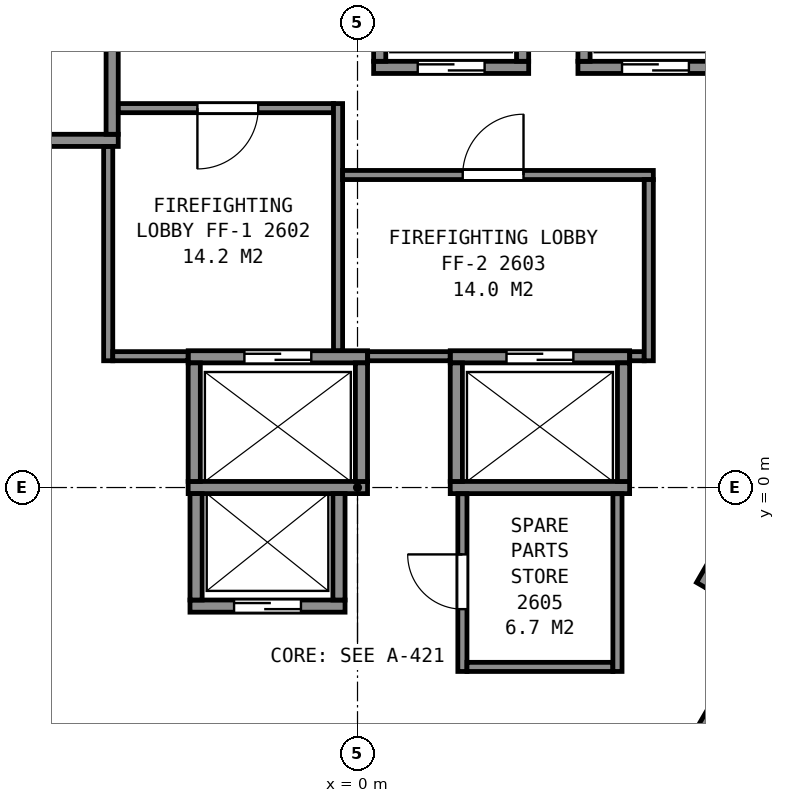
"""IFC4 building model, lengths in metres.
Left out: names, types, materials, properties, quantities, classifications, styles, units other than length and angle.
Written with IfcOpenShell. Run it as: python <this file> out.ifc"""

import sys

from ifc_helpers import new_model, si_unit, direction, frame, frame_2d, origin, place, context, subcontext, project, spatial, rectangle, extrude, element, fill, save


model = new_model("IFC4")
c1 = context("Model", 3, precision=1e-05, world=origin(), true_north=direction((0.0, 1.0)))
c2 = subcontext(c1, "Body", "Model", "MODEL_VIEW")
j1 = project(units=[si_unit("LENGTHUNIT", "METRE"), si_unit("PLANEANGLEUNIT", "RADIAN")], contexts=[c1])
p1 = place(None, origin())
s1 = spatial("IfcSite", under=j1, at=p1, CompositionType="ELEMENT")
p2 = place(p1, origin())
s2 = spatial("IfcBuilding", under=s1, at=p2, CompositionType="ELEMENT")
p3 = place(p2, frame((0.0, 0.0, 110.8)))
s3 = spatial("IfcBuildingStorey", under=s2, at=p3, CompositionType="ELEMENT", Elevation=110.8)
p4 = place(p3, frame((-2.755, -1.95, 0.0), z_axis=(0.0, 0.0, 1.0), x_axis=(1.0, 0.0, 0.0)))
e1 = element("IfcWall", 1, at=p4, inside=s3, PredefinedType="PARTITIONING", context=c2, shape_type="SweptSolid", body=[
    extrude(rectangle(XDim=2.55, YDim=0.2, at=frame_2d((1.275, 0.0))), origin(), (0.0, 0.0, 1.0), 3.6),
])
p5 = place(p4, frame((0.725, 0.0, 0.0)))
e2 = element("IfcOpeningElement", 2, at=p5, cuts=e1, PredefinedType="OPENING", context=c2, shape_type="SweptSolid", body=[
    extrude(rectangle(XDim=1.1, YDim=2.1, at=frame_2d((0.55, 1.05))), frame((0.0, 0.11, 0.0), z_axis=(0.0, -1.0, 0.0), x_axis=(1.0, 0.0, 0.0)), (0.0, 0.0, 1.0), 0.22),
])
p6 = place(p3, frame((-2.785, 0.0, 0.0), z_axis=(0.0, 0.0, 1.0), x_axis=(1.0, 0.0, 0.0)))
e3 = element("IfcWall", 3, at=p6, inside=s3, PredefinedType="PARTITIONING", context=c2, shape_type="SweptSolid", body=[
    extrude(rectangle(XDim=2.95, YDim=0.2, at=frame_2d((1.475, 0.0))), origin(), (0.0, 0.0, 1.0), 3.6),
])
p7 = place(p3, frame((1.525, 0.0, 0.0), z_axis=(0.0, 0.0, 1.0), x_axis=(1.0, 0.0, 0.0)))
e4 = element("IfcWall", 4, at=p7, inside=s3, PredefinedType="PARTITIONING", context=c2, shape_type="SweptSolid", body=[
    extrude(rectangle(XDim=2.95, YDim=0.2, at=frame_2d((1.475, 0.0))), origin(), (0.0, 0.0, 1.0), 3.6),
])
p8 = place(p3, frame((-2.785, 2.15, 0.0), z_axis=(0.0, 0.0, 1.0), x_axis=(1.0, 0.0, 0.0)))
e5 = element("IfcWall", 5, at=p8, inside=s3, PredefinedType="PARTITIONING", context=c2, shape_type="SweptSolid", body=[
    extrude(rectangle(XDim=2.95, YDim=0.2, at=frame_2d((1.475, 0.0))), origin(), (0.0, 0.0, 1.0), 3.6),
])
p9 = place(p8, frame((0.925, 0.0, 0.0)))
e6 = element("IfcOpeningElement", 6, at=p9, cuts=e5, PredefinedType="OPENING", context=c2, shape_type="SweptSolid", body=[
    extrude(rectangle(XDim=1.1, YDim=2.1, at=frame_2d((0.55, 1.05))), frame((0.0, 0.11, 0.0), z_axis=(0.0, -1.0, 0.0), x_axis=(1.0, 0.0, 0.0)), (0.0, 0.0, 1.0), 0.22),
])
p10 = place(p3, frame((1.525, 2.15, 0.0), z_axis=(0.0, 0.0, 1.0), x_axis=(1.0, 0.0, 0.0)))
e7 = element("IfcWall", 7, at=p10, inside=s3, PredefinedType="PARTITIONING", context=c2, shape_type="SweptSolid", body=[
    extrude(rectangle(XDim=2.95, YDim=0.2, at=frame_2d((1.475, 0.0))), origin(), (0.0, 0.0, 1.0), 3.6),
])
p11 = place(p10, frame((0.925, 0.0, 0.0)))
e8 = element("IfcOpeningElement", 8, at=p11, cuts=e7, PredefinedType="OPENING", context=c2, shape_type="SweptSolid", body=[
    extrude(rectangle(XDim=1.1, YDim=2.1, at=frame_2d((0.55, 1.05))), frame((0.0, 0.11, 0.0), z_axis=(0.0, -1.0, 0.0), x_axis=(1.0, 0.0, 0.0)), (0.0, 0.0, 1.0), 0.22),
])
p12 = place(p3, frame((-6.285, 5.71, 0.0), z_axis=(0.0, 0.0, 1.0), x_axis=(1.0, 0.0, 0.0)))
e9 = element("IfcWall", 9, at=p12, inside=s3, PredefinedType="PARTITIONING", context=c2, shape_type="SweptSolid", body=[
    extrude(rectangle(XDim=2.35, YDim=0.2, at=frame_2d((1.175, 0.0))), origin(), (0.0, 0.0, 1.0), 3.6),
])
p13 = place(p3, frame((0.265, 6.91, 0.0), z_axis=(0.0, 0.0, 1.0), x_axis=(1.0, 0.0, 0.0)))
e10 = element("IfcWall", 10, at=p13, inside=s3, PredefinedType="PARTITIONING", context=c2, shape_type="SweptSolid", body=[
    extrude(rectangle(XDim=2.55, YDim=0.2, at=frame_2d((1.275, 0.0))), origin(), (0.0, 0.0, 1.0), 3.6),
])
p14 = place(p13, frame((0.725, 0.0, 0.0)))
e11 = element("IfcOpeningElement", 11, at=p14, cuts=e10, PredefinedType="OPENING", context=c2, shape_type="SweptSolid", body=[
    extrude(rectangle(XDim=1.1, YDim=2.1, at=frame_2d((0.55, 1.05))), frame((0.0, 0.11, 0.0), z_axis=(0.0, -1.0, 0.0), x_axis=(1.0, 0.0, 0.0)), (0.0, 0.0, 1.0), 0.22),
])
p15 = place(p3, frame((3.625, 6.91, 0.0), z_axis=(0.0, 0.0, 1.0), x_axis=(1.0, 0.0, 0.0)))
e12 = element("IfcWall", 12, at=p15, inside=s3, PredefinedType="PARTITIONING", context=c2, shape_type="SweptSolid", body=[
    extrude(rectangle(XDim=2.55, YDim=0.2, at=frame_2d((1.275, 0.0))), origin(), (0.0, 0.0, 1.0), 3.6),
])
p16 = place(p15, frame((0.725, 0.0, 0.0)))
e13 = element("IfcOpeningElement", 13, at=p16, cuts=e12, PredefinedType="OPENING", context=c2, shape_type="SweptSolid", body=[
    extrude(rectangle(XDim=1.1, YDim=2.1, at=frame_2d((0.55, 1.05))), frame((0.0, 0.11, 0.0), z_axis=(0.0, -1.0, 0.0), x_axis=(1.0, 0.0, 0.0)), (0.0, 0.0, 1.0), 0.22),
])
p17 = place(p3, frame((5.527, -4.247, 0.0), z_axis=(0.0, 0.0, 1.0), x_axis=(0.499938297808, 0.866061024631, 0.0)))
e14 = element("IfcWall", 14, at=p17, inside=s3, PredefinedType="PARTITIONING", context=c2, shape_type="SweptSolid", body=[
    extrude(rectangle(XDim=2.35, YDim=0.2, at=frame_2d((1.175, 0.0))), origin(), (0.0, 0.0, 1.0), 3.6),
])
p18 = place(p17, frame((0.725, 0.0, 0.0)))
e15 = element("IfcOpeningElement", 15, at=p18, cuts=e14, PredefinedType="OPENING", context=c2, shape_type="SweptSolid", body=[
    extrude(rectangle(XDim=1.1, YDim=2.1, at=frame_2d((0.55, 1.05))), frame((0.0, 0.11, 0.0), z_axis=(0.0, -1.0, 0.0), x_axis=(1.0, 0.0, 0.0)), (0.0, 0.0, 1.0), 0.22),
])
p19 = place(p3, frame((5.663, -1.612, 0.0), z_axis=(0.0, 0.0, 1.0), x_axis=(0.49998122708, 0.866036242063, 0.0)))
e16 = element("IfcWall", 16, at=p19, inside=s3, PredefinedType="PARTITIONING", context=c2, shape_type="SweptSolid", body=[
    extrude(rectangle(XDim=4.9, YDim=0.2, at=frame_2d((2.45, 0.0))), origin(), (0.0, 0.0, 1.0), 3.6),
])
p20 = place(p3, frame((4.375, 0.1, 0.0), z_axis=(0.0, 0.0, 1.0), x_axis=(0.0, 1.0, 0.0)))
e17 = element("IfcWall", 17, at=p20, inside=s3, PredefinedType="PARTITIONING", context=c2, shape_type="SweptSolid", body=[
    extrude(rectangle(XDim=1.95, YDim=0.2, at=frame_2d((0.975, 0.0))), origin(), (0.0, 0.0, 1.0), 3.6),
])
for number, where, z_axis, x_axis in (
    (18, (3.725, 7.01, 0.0), (0.0, 0.0, 1.0), (0.0, 1.0, 0.0)),
    (19, (2.715, 7.01, 0.0), (0.0, 0.0, 1.0), (0.0, 1.0, 0.0)),
):
    element("IfcWall", number, at=place(p3, frame(where, z_axis=z_axis, x_axis=x_axis)), inside=s3, PredefinedType="PARTITIONING", context=c2, shape_type="SweptSolid", body=[
        extrude(rectangle(XDim=1.75, YDim=0.2, at=frame_2d((0.875, 0.0))), origin(), (0.0, 0.0, 1.0), 3.6),
    ])
p21 = place(p3, frame((1.625, 0.1, 0.0), z_axis=(0.0, 0.0, 1.0), x_axis=(0.0, 1.0, 0.0)))
e20 = element("IfcWall", 20, at=p21, inside=s3, PredefinedType="PARTITIONING", context=c2, shape_type="SweptSolid", body=[
    extrude(rectangle(XDim=1.95, YDim=0.2, at=frame_2d((0.975, 0.0))), origin(), (0.0, 0.0, 1.0), 3.6),
])
p22 = place(p3, frame((0.365, 7.01, 0.0), z_axis=(0.0, 0.0, 1.0), x_axis=(0.0, 1.0, 0.0)))
e21 = element("IfcWall", 21, at=p22, inside=s3, PredefinedType="PARTITIONING", context=c2, shape_type="SweptSolid", body=[
    extrude(rectangle(XDim=1.75, YDim=0.2, at=frame_2d((0.875, 0.0))), origin(), (0.0, 0.0, 1.0), 3.6),
])
p23 = place(p3, frame((0.065, 0.1, 0.0), z_axis=(0.0, 0.0, 1.0), x_axis=(0.0, 1.0, 0.0)))
e22 = element("IfcWall", 22, at=p23, inside=s3, PredefinedType="PARTITIONING", context=c2, shape_type="SweptSolid", body=[
    extrude(rectangle(XDim=1.95, YDim=0.2, at=frame_2d((0.975, 0.0))), origin(), (0.0, 0.0, 1.0), 3.6),
])
for number, where, z_axis, x_axis in (
    (23, (-0.305, -1.85, 0.0), (0.0, 0.0, 1.0), (0.0, 1.0, 0.0)),
    (24, (-2.655, -1.85, 0.0), (0.0, 0.0, 1.0), (0.0, 1.0, 0.0)),
):
    element("IfcWall", number, at=place(p3, frame(where, z_axis=z_axis, x_axis=x_axis)), inside=s3, PredefinedType="PARTITIONING", context=c2, shape_type="SweptSolid", body=[
        extrude(rectangle(XDim=1.75, YDim=0.2, at=frame_2d((0.875, 0.0))), origin(), (0.0, 0.0, 1.0), 3.6),
    ])
p24 = place(p3, frame((-2.685, 0.1, 0.0), z_axis=(0.0, 0.0, 1.0), x_axis=(0.0, 1.0, 0.0)))
e25 = element("IfcWall", 25, at=p24, inside=s3, PredefinedType="PARTITIONING", context=c2, shape_type="SweptSolid", body=[
    extrude(rectangle(XDim=1.95, YDim=0.2, at=frame_2d((0.975, 0.0))), origin(), (0.0, 0.0, 1.0), 3.6),
])
p25 = place(p3, frame((-4.035, 5.81, 0.0), z_axis=(0.0, 0.0, 1.0), x_axis=(0.0, 1.0, 0.0)))
e26 = element("IfcWall", 26, at=p25, inside=s3, PredefinedType="PARTITIONING", context=c2, shape_type="SweptSolid", body=[
    extrude(rectangle(XDim=1.75, YDim=0.2, at=frame_2d((0.875, 0.0))), origin(), (0.0, 0.0, 1.0), 3.6),
])
p26 = place(p3, frame((-13.664, 5.946, 0.0), z_axis=(0.0, 0.0, 1.0), x_axis=(0.499994327219, -0.866028678941, 0.0)))
e27 = element("IfcWall", 27, at=p26, inside=s3, PredefinedType="PARTITIONING", context=c2, shape_type="SweptSolid", body=[
    extrude(rectangle(XDim=23.968, YDim=0.2, at=frame_2d((11.984, 0.0))), origin(), (0.0, 0.0, 1.0), 3.35),
])
p27 = place(p3, frame((-4.152, -5.729, 0.0), z_axis=(0.0, 0.0, 1.0), x_axis=(-0.500024287448, 0.866011380966, 0.0)))
e28 = element("IfcWall", 28, at=p27, inside=s3, PredefinedType="PARTITIONING", context=c2, shape_type="SweptSolid", body=[
    extrude(rectangle(XDim=3.501, YDim=0.15, at=frame_2d((1.75, 0.0))), origin(), (0.0, 0.0, 1.0), 3.35),
])
p28 = place(p27, frame((2.026, 0.0, 0.0)))
e29 = element("IfcOpeningElement", 29, at=p28, cuts=e28, PredefinedType="OPENING", context=c2, shape_type="SweptSolid", body=[
    extrude(rectangle(XDim=0.9, YDim=2.1, at=frame_2d((0.45, 1.05))), frame((0.0, 0.085, 0.0), z_axis=(0.0, -1.0, 0.0), x_axis=(1.0, 0.0, 0.0)), (0.0, 0.0, 1.0), 0.17),
])
p29 = place(p27, frame((0.248, 0.0, 0.0)))
e30 = element("IfcOpeningElement", 30, at=p29, cuts=e28, PredefinedType="OPENING", context=c2, shape_type="SweptSolid", body=[
    extrude(rectangle(XDim=0.9, YDim=2.1, at=frame_2d((0.45, 1.05))), frame((0.0, 0.085, 0.0), z_axis=(0.0, -1.0, 0.0), x_axis=(1.0, 0.0, 0.0)), (0.0, 0.0, 1.0), 0.17),
])
p30 = place(p3, frame((-4.1, 2.085, 0.0), z_axis=(0.0, 0.0, 1.0), x_axis=(0.0, 1.0, 0.0)))
e31 = element("IfcWall", 31, at=p30, inside=s3, PredefinedType="PARTITIONING", context=c2, shape_type="SweptSolid", body=[
    extrude(rectangle(XDim=3.523, YDim=0.15, at=frame_2d((1.761, 0.0))), origin(), (0.0, 0.0, 1.0), 3.35),
])
p31 = place(p3, frame((-4.025, 2.16, 0.0), z_axis=(0.0, 0.0, 1.0), x_axis=(1.0, 0.0, 0.0)))
e32 = element("IfcWall", 32, at=p31, inside=s3, PredefinedType="PARTITIONING", context=c2, shape_type="SweptSolid", body=[
    extrude(rectangle(XDim=1.238, YDim=0.15, at=frame_2d((0.619, 0.0))), origin(), (0.0, 0.0, 1.0), 3.35),
])
p32 = place(p3, frame((-3.933, 6.24, 0.0), z_axis=(0.0, 0.0, 1.0), x_axis=(1.0, 0.0, 0.0)))
e33 = element("IfcWall", 33, at=p32, inside=s3, PredefinedType="PARTITIONING", context=c2, shape_type="SweptSolid", body=[
    extrude(rectangle(XDim=3.538, YDim=0.15, at=frame_2d((1.769, 0.0))), origin(), (0.0, 0.0, 1.0), 3.35),
])
p33 = place(p32, frame((1.3, 0.0, 0.0)))
e34 = element("IfcOpeningElement", 34, at=p33, cuts=e33, PredefinedType="OPENING", context=c2, shape_type="SweptSolid", body=[
    extrude(rectangle(XDim=1.0, YDim=2.1, at=frame_2d((0.5, 1.05))), frame((0.0, 0.085, 0.0), z_axis=(0.0, -1.0, 0.0), x_axis=(1.0, 0.0, 0.0)), (0.0, 0.0, 1.0), 0.17),
])
p34 = place(p3, frame((-0.32, 2.252, 0.0), z_axis=(0.0, 0.0, 1.0), x_axis=(0.0, 1.0, 0.0)))
e35 = element("IfcWall", 35, at=p34, inside=s3, PredefinedType="PARTITIONING", context=c2, shape_type="SweptSolid", body=[
    extrude(rectangle(XDim=4.063, YDim=0.15, at=frame_2d((2.031, 0.0))), origin(), (0.0, 0.0, 1.0), 3.35),
])
p35 = place(p3, frame((-0.245, 5.14, 0.0), z_axis=(0.0, 0.0, 1.0), x_axis=(1.0, 0.0, 0.0)))
e36 = element("IfcWall", 36, at=p35, inside=s3, PredefinedType="PARTITIONING", context=c2, shape_type="SweptSolid", body=[
    extrude(rectangle(XDim=5.11, YDim=0.15, at=frame_2d((2.555, 0.0))), origin(), (0.0, 0.0, 1.0), 3.35),
])
p36 = place(p35, frame((1.975, 0.0, 0.0)))
e37 = element("IfcOpeningElement", 37, at=p36, cuts=e36, PredefinedType="OPENING", context=c2, shape_type="SweptSolid", body=[
    extrude(rectangle(XDim=1.0, YDim=2.1, at=frame_2d((0.5, 1.05))), frame((0.0, 0.085, 0.0), z_axis=(0.0, -1.0, 0.0), x_axis=(1.0, 0.0, 0.0)), (0.0, 0.0, 1.0), 0.17),
])
p37 = place(p3, frame((0.167, 2.16, 0.0), z_axis=(0.0, 0.0, 1.0), x_axis=(1.0, 0.0, 0.0)))
e38 = element("IfcWall", 38, at=p37, inside=s3, PredefinedType="PARTITIONING", context=c2, shape_type="SweptSolid", body=[
    extrude(rectangle(XDim=1.356, YDim=0.15, at=frame_2d((0.678, 0.0))), origin(), (0.0, 0.0, 1.0), 3.35),
])
p38 = place(p3, frame((1.725, -0.102, 0.0), z_axis=(0.0, 0.0, 1.0), x_axis=(0.0, -1.0, 0.0)))
e39 = element("IfcWall", 39, at=p38, inside=s3, PredefinedType="PARTITIONING", context=c2, shape_type="SweptSolid", body=[
    extrude(rectangle(XDim=2.923, YDim=0.15, at=frame_2d((1.461, 0.0))), origin(), (0.0, 0.0, 1.0), 3.35),
])
p39 = place(p38, frame((0.998, 0.0, 0.0)))
e40 = element("IfcOpeningElement", 40, at=p39, cuts=e39, PredefinedType="OPENING", context=c2, shape_type="SweptSolid", body=[
    extrude(rectangle(XDim=0.9, YDim=2.1, at=frame_2d((0.45, 1.05))), frame((0.0, 0.085, 0.0), z_axis=(0.0, -1.0, 0.0), x_axis=(1.0, 0.0, 0.0)), (0.0, 0.0, 1.0), 0.17),
])
p40 = place(p3, frame((1.8, -2.95, 0.0), z_axis=(0.0, 0.0, 1.0), x_axis=(1.0, 0.0, 0.0)))
e41 = element("IfcWall", 41, at=p40, inside=s3, PredefinedType="PARTITIONING", context=c2, shape_type="SweptSolid", body=[
    extrude(rectangle(XDim=2.4, YDim=0.15, at=frame_2d((1.2, 0.0))), origin(), (0.0, 0.0, 1.0), 3.35),
])
p41 = place(p3, frame((4.275, -3.025, 0.0), z_axis=(0.0, 0.0, 1.0), x_axis=(0.0, 1.0, 0.0)))
e42 = element("IfcWall", 42, at=p41, inside=s3, PredefinedType="PARTITIONING", context=c2, shape_type="SweptSolid", body=[
    extrude(rectangle(XDim=2.923, YDim=0.15, at=frame_2d((1.461, 0.0))), origin(), (0.0, 0.0, 1.0), 3.35),
])
p42 = place(p3, frame((4.477, 2.16, 0.0), z_axis=(0.0, 0.0, 1.0), x_axis=(1.0, 0.0, 0.0)))
e43 = element("IfcWall", 43, at=p42, inside=s3, PredefinedType="PARTITIONING", context=c2, shape_type="SweptSolid", body=[
    extrude(rectangle(XDim=0.238, YDim=0.15, at=frame_2d((0.119, 0.0))), origin(), (0.0, 0.0, 1.0), 3.35),
])
p43 = place(p3, frame((4.79, 2.085, 0.0), z_axis=(0.0, 0.0, 1.0), x_axis=(0.0, 1.0, 0.0)))
e44 = element("IfcWall", 44, at=p43, inside=s3, PredefinedType="PARTITIONING", context=c2, shape_type="SweptSolid", body=[
    extrude(rectangle(XDim=2.98, YDim=0.15, at=frame_2d((1.49, 0.0))), origin(), (0.0, 0.0, 1.0), 3.35),
])
p44 = place(p3, frame((-3.756, -15.494, 0.0), z_axis=(0.0, 0.0, 1.0), x_axis=(-0.500027787016, 0.866009360349, 0.0)))
e45 = element("IfcWall", 45, at=p44, inside=s3, PredefinedType="PARTITIONING", context=c2, shape_type="SweptSolid", body=[
    extrude(rectangle(XDim=23.856, YDim=0.125, at=frame_2d((11.928, 0.0))), origin(), (0.0, 0.0, 1.0), 2.613),
])
p45 = place(p44, frame((15.368, 0.0, 0.0)))
e46 = element("IfcOpeningElement", 46, at=p45, cuts=e45, PredefinedType="OPENING", context=c2, shape_type="SweptSolid", body=[
    extrude(rectangle(XDim=1.0, YDim=2.1, at=frame_2d((0.5, 1.05))), frame((0.0, 0.073, 0.0), z_axis=(0.0, -1.0, 0.0), x_axis=(1.0, 0.0, 0.0)), (0.0, 0.0, 1.0), 0.145),
])
p46 = place(p44, frame((10.54, 0.0, 0.0)))
e47 = element("IfcOpeningElement", 47, at=p46, cuts=e45, PredefinedType="OPENING", context=c2, shape_type="SweptSolid", body=[
    extrude(rectangle(XDim=1.0, YDim=2.1, at=frame_2d((0.5, 1.05))), frame((0.0, 0.073, 0.0), z_axis=(0.0, -1.0, 0.0), x_axis=(1.0, 0.0, 0.0)), (0.0, 0.0, 1.0), 0.145),
])
p47 = place(p3, frame((15.684, 5.165, 0.0), z_axis=(0.0, 0.0, 1.0), x_axis=(-0.500027787016, -0.866009360349, 0.0)))
e48 = element("IfcWall", 48, at=p47, inside=s3, PredefinedType="PARTITIONING", context=c2, shape_type="SweptSolid", body=[
    extrude(rectangle(XDim=23.856, YDim=0.125, at=frame_2d((11.928, 0.0))), origin(), (0.0, 0.0, 1.0), 2.613),
])
p48 = place(p47, frame((16.996, 0.0, 0.0)))
e49 = element("IfcOpeningElement", 49, at=p48, cuts=e48, PredefinedType="OPENING", context=c2, shape_type="SweptSolid", body=[
    extrude(rectangle(XDim=1.0, YDim=2.1, at=frame_2d((0.5, 1.05))), frame((0.0, 0.073, 0.0), z_axis=(0.0, -1.0, 0.0), x_axis=(1.0, 0.0, 0.0)), (0.0, 0.0, 1.0), 0.145),
])
p49 = place(p47, frame((12.28, 0.0, 0.0)))
e50 = element("IfcOpeningElement", 50, at=p49, cuts=e48, PredefinedType="OPENING", context=c2, shape_type="SweptSolid", body=[
    extrude(rectangle(XDim=1.0, YDim=2.1, at=frame_2d((0.5, 1.05))), frame((0.0, 0.073, 0.0), z_axis=(0.0, -1.0, 0.0), x_axis=(1.0, 0.0, 0.0)), (0.0, 0.0, 1.0), 0.145),
])
p50 = place(p14, origin())
e51 = element("IfcDoor", 51, at=p50, inside=s3, OperationType="SLIDING_TO_LEFT", PredefinedType="DOOR", context=c2, shape_type="SweptSolid", body=[
    extrude(rectangle(XDim=1.1, YDim=2.1, at=frame_2d((0.55, 1.05))), frame((0.0, 0.025, 0.0), z_axis=(0.0, -1.0, 0.0), x_axis=(1.0, 0.0, 0.0)), (0.0, 0.0, 1.0), 0.05),
])
fill(e11, e51)
p51 = place(p5, origin())
e52 = element("IfcDoor", 52, at=p51, inside=s3, OperationType="SLIDING_TO_RIGHT", PredefinedType="DOOR", context=c2, shape_type="SweptSolid", body=[
    extrude(rectangle(XDim=1.1, YDim=2.1, at=frame_2d((0.55, 1.05))), frame((0.0, 0.025, 0.0), z_axis=(0.0, -1.0, 0.0), x_axis=(1.0, 0.0, 0.0)), (0.0, 0.0, 1.0), 0.05),
])
fill(e2, e52)
p52 = place(p16, origin())
e53 = element("IfcDoor", 53, at=p52, inside=s3, OperationType="SLIDING_TO_LEFT", PredefinedType="DOOR", context=c2, shape_type="SweptSolid", body=[
    extrude(rectangle(XDim=1.1, YDim=2.1, at=frame_2d((0.55, 1.05))), frame((0.0, 0.025, 0.0), z_axis=(0.0, -1.0, 0.0), x_axis=(1.0, 0.0, 0.0)), (0.0, 0.0, 1.0), 0.05),
])
fill(e13, e53)
p53 = place(p9, origin())
e54 = element("IfcDoor", 54, at=p53, inside=s3, OperationType="SLIDING_TO_LEFT", PredefinedType="DOOR", context=c2, shape_type="SweptSolid", body=[
    extrude(rectangle(XDim=1.1, YDim=2.1, at=frame_2d((0.55, 1.05))), frame((0.0, 0.025, 0.0), z_axis=(0.0, -1.0, 0.0), x_axis=(1.0, 0.0, 0.0)), (0.0, 0.0, 1.0), 0.05),
])
fill(e6, e54)
p54 = place(p11, origin())
e55 = element("IfcDoor", 55, at=p54, inside=s3, OperationType="SLIDING_TO_RIGHT", PredefinedType="DOOR", context=c2, shape_type="SweptSolid", body=[
    extrude(rectangle(XDim=1.1, YDim=2.1, at=frame_2d((0.55, 1.05))), frame((0.0, 0.025, 0.0), z_axis=(0.0, -1.0, 0.0), x_axis=(1.0, 0.0, 0.0)), (0.0, 0.0, 1.0), 0.05),
])
fill(e8, e55)
p55 = place(p33, origin())
e56 = element("IfcDoor", 56, at=p55, inside=s3, OperationType="SINGLE_SWING_LEFT", PredefinedType="DOOR", context=c2, shape_type="SweptSolid", body=[
    extrude(rectangle(XDim=1.0, YDim=2.1, at=frame_2d((0.5, 1.05))), frame((0.0, 0.025, 0.0), z_axis=(0.0, -1.0, 0.0), x_axis=(1.0, 0.0, 0.0)), (0.0, 0.0, 1.0), 0.05),
])
fill(e34, e56)
p56 = place(p36, origin())
e57 = element("IfcDoor", 57, at=p56, inside=s3, OperationType="SINGLE_SWING_RIGHT", PredefinedType="DOOR", context=c2, shape_type="SweptSolid", body=[
    extrude(rectangle(XDim=1.0, YDim=2.1, at=frame_2d((0.5, 1.05))), frame((0.0, 0.025, 0.0), z_axis=(0.0, -1.0, 0.0), x_axis=(1.0, 0.0, 0.0)), (0.0, 0.0, 1.0), 0.05),
])
fill(e37, e57)
p57 = place(p39, origin())
e58 = element("IfcDoor", 58, at=p57, inside=s3, OperationType="SINGLE_SWING_LEFT", PredefinedType="DOOR", context=c2, shape_type="SweptSolid", body=[
    extrude(rectangle(XDim=0.9, YDim=2.1, at=frame_2d((0.45, 1.05))), frame((0.0, 0.025, 0.0), z_axis=(0.0, -1.0, 0.0), x_axis=(1.0, 0.0, 0.0)), (0.0, 0.0, 1.0), 0.05),
])
fill(e40, e58)
save(model, sys.argv[1])
